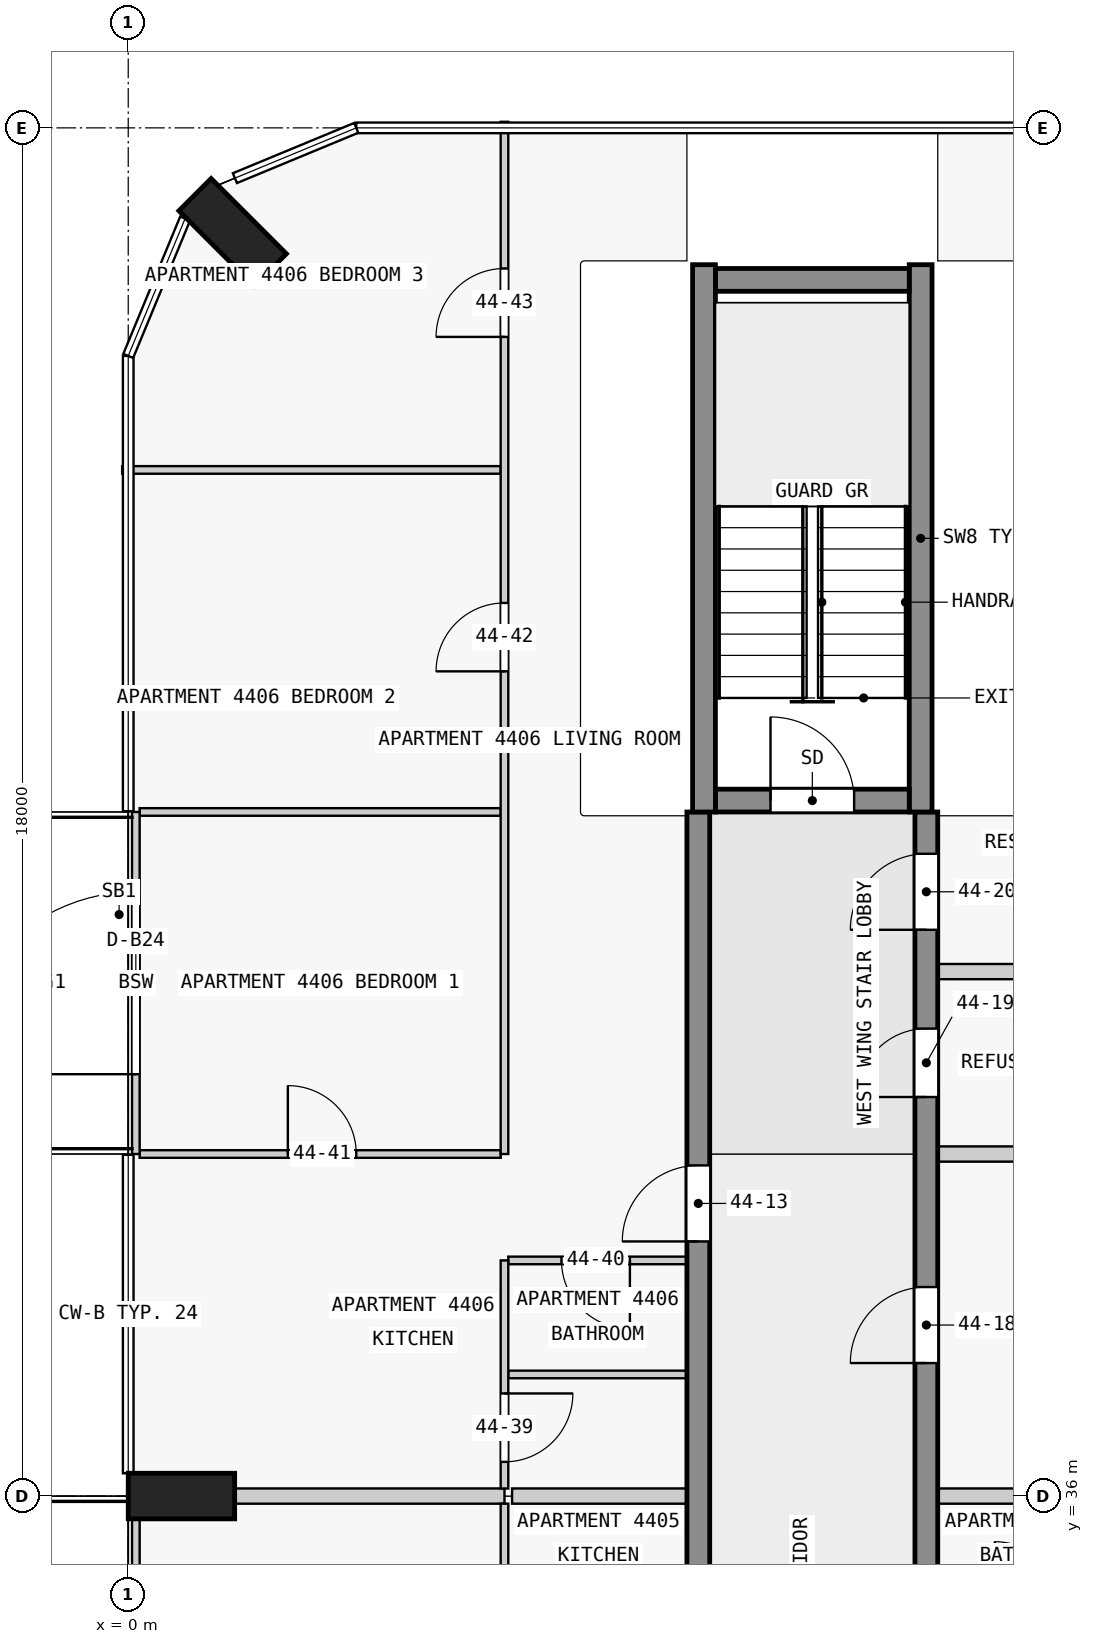
"""IFC4 building model, lengths in metres.
Left out: names, types, materials, properties, quantities, classifications, styles, units other than length and angle.
Written with IfcOpenShell. Run it as: python <this file> out.ifc"""

import sys

from ifc_helpers import new_model, si_unit, direction, frame, frame_2d, origin, origin_2d, place, context, subcontext, project, spatial, rectangle, extrude, element, fill, save


model = new_model("IFC4")
c1 = context("Model", 3, precision=1e-05, world=origin(), true_north=direction((0.0, 1.0)))
c2 = subcontext(c1, "Body", "Model", "MODEL_VIEW")
j1 = project(units=[si_unit("LENGTHUNIT", "METRE"), si_unit("PLANEANGLEUNIT", "RADIAN")], contexts=[c1])
p1 = place(None, origin())
s1 = spatial("IfcSite", under=j1, at=p1, CompositionType="ELEMENT")
p2 = place(p1, origin())
s2 = spatial("IfcBuilding", under=s1, at=p2, CompositionType="ELEMENT")
p3 = place(p2, frame((0.0, 0.0, 170.9)))
s3 = spatial("IfcBuildingStorey", under=s2, at=p3, CompositionType="ELEMENT", Elevation=170.9)
for number, where, z_axis, x_axis in (
    (1, (1.374, 52.626, 0.0), (0.0, 0.0, 1.0), (0.707, 0.707, 0.0)),
    (2, (0.7, 36.0, 0.0), (0.0, 0.0, 1.0), (0.0, 1.0, 0.0)),
):
    element("IfcColumn", number, at=place(p3, frame(where, z_axis=z_axis, x_axis=x_axis)), inside=s3, PredefinedType="COLUMN", context=c2, shape_type="SweptSolid", body=[
        extrude(rectangle(XDim=0.6, YDim=1.4, at=origin_2d()), origin(), (0.0, 0.0, 1.0), 3.5),
    ])
p4 = place(p3, frame((7.725, 45.15, 0.0), z_axis=(0.0, 0.0, 1.0), x_axis=(1.0, 0.0, 0.0)))
e3 = element("IfcWall", 3, at=p4, inside=s3, PredefinedType="SHEAR", context=c2, shape_type="SweptSolid", body=[
    extrude(rectangle(XDim=2.55, YDim=0.3, at=frame_2d((1.275, 0.0))), origin(), (0.0, 0.0, 1.0), 3.5),
])
p5 = place(p4, frame((0.725, 0.0, 0.0)))
e4 = element("IfcOpeningElement", 4, at=p5, cuts=e3, PredefinedType="OPENING", context=c2, shape_type="SweptSolid", body=[
    extrude(rectangle(XDim=1.1, YDim=2.1, at=frame_2d((0.55, 1.05))), frame((0.0, 0.16, 0.0), z_axis=(0.0, -1.0, 0.0), x_axis=(1.0, 0.0, 0.0)), (0.0, 0.0, 1.0), 0.32),
])
p6 = place(p3, frame((7.725, 52.0, 0.0), z_axis=(0.0, 0.0, 1.0), x_axis=(1.0, 0.0, 0.0)))
e5 = element("IfcWall", 5, at=p6, inside=s3, PredefinedType="SHEAR", context=c2, shape_type="SweptSolid", body=[
    extrude(rectangle(XDim=2.55, YDim=0.3, at=frame_2d((1.275, 0.0))), origin(), (0.0, 0.0, 1.0), 3.5),
])
for number, where, z_axis, x_axis in (
    (6, (7.575, 45.0, 0.0), (0.0, 0.0, 1.0), (0.0, 1.0, 0.0)),
    (7, (10.425, 45.0, 0.0), (0.0, 0.0, 1.0), (0.0, 1.0, 0.0)),
):
    element("IfcWall", number, at=place(p3, frame(where, z_axis=z_axis, x_axis=x_axis)), inside=s3, PredefinedType="SHEAR", context=c2, shape_type="SweptSolid", body=[
        extrude(rectangle(XDim=7.2, YDim=0.3, at=frame_2d((3.6, 0.0))), origin(), (0.0, 0.0, 1.0), 3.5),
    ])
p7 = place(p3, frame((7.5, 18.0, 0.0), z_axis=(0.0, 0.0, 1.0), x_axis=(0.0, 1.0, 0.0)))
e8 = element("IfcWall", 8, at=p7, inside=s3, PredefinedType="SHEAR", context=c2, shape_type="SweptSolid", body=[
    extrude(rectangle(XDim=27.0, YDim=0.3, at=frame_2d((13.5, 0.0))), origin(), (0.0, 0.0, 1.0), 3.25),
])
p8 = place(p7, frame((1.75, 0.0, 0.0)))
e9 = element("IfcOpeningElement", 9, at=p8, cuts=e8, PredefinedType="OPENING", context=c2, shape_type="SweptSolid", body=[
    extrude(rectangle(XDim=1.0, YDim=2.1, at=frame_2d((0.5, 1.05))), frame((0.0, 0.16, 0.0), z_axis=(0.0, -1.0, 0.0), x_axis=(1.0, 0.0, 0.0)), (0.0, 0.0, 1.0), 0.32),
])
p9 = place(p7, frame((5.85, 0.0, 0.0)))
e10 = element("IfcOpeningElement", 10, at=p9, cuts=e8, PredefinedType="OPENING", context=c2, shape_type="SweptSolid", body=[
    extrude(rectangle(XDim=1.8, YDim=2.1, at=frame_2d((0.9, 1.05))), frame((0.0, 0.16, 0.0), z_axis=(0.0, -1.0, 0.0), x_axis=(1.0, 0.0, 0.0)), (0.0, 0.0, 1.0), 0.32),
])
p10 = place(p7, frame((13.05, 0.0, 0.0)))
e11 = element("IfcOpeningElement", 11, at=p10, cuts=e8, PredefinedType="OPENING", context=c2, shape_type="SweptSolid", body=[
    extrude(rectangle(XDim=1.0, YDim=2.1, at=frame_2d((0.5, 1.05))), frame((0.0, 0.16, 0.0), z_axis=(0.0, -1.0, 0.0), x_axis=(1.0, 0.0, 0.0)), (0.0, 0.0, 1.0), 0.32),
])
p11 = place(p7, frame((21.35, 0.0, 0.0)))
e12 = element("IfcOpeningElement", 12, at=p11, cuts=e8, PredefinedType="OPENING", context=c2, shape_type="SweptSolid", body=[
    extrude(rectangle(XDim=1.0, YDim=2.1, at=frame_2d((0.5, 1.05))), frame((0.0, 0.16, 0.0), z_axis=(0.0, -1.0, 0.0), x_axis=(1.0, 0.0, 0.0)), (0.0, 0.0, 1.0), 0.32),
])
p12 = place(p3, frame((10.5, 18.0, 0.0), z_axis=(0.0, 0.0, 1.0), x_axis=(0.0, 1.0, 0.0)))
e13 = element("IfcWall", 13, at=p12, inside=s3, PredefinedType="SHEAR", context=c2, shape_type="SweptSolid", body=[
    extrude(rectangle(XDim=27.0, YDim=0.3, at=frame_2d((13.5, 0.0))), origin(), (0.0, 0.0, 1.0), 3.25),
])
p13 = place(p12, frame((1.75, 0.0, 0.0)))
e14 = element("IfcOpeningElement", 14, at=p13, cuts=e13, PredefinedType="OPENING", context=c2, shape_type="SweptSolid", body=[
    extrude(rectangle(XDim=1.0, YDim=2.1, at=frame_2d((0.5, 1.05))), frame((0.0, 0.16, 0.0), z_axis=(0.0, -1.0, 0.0), x_axis=(1.0, 0.0, 0.0)), (0.0, 0.0, 1.0), 0.32),
])
p14 = place(p12, frame((6.25, 0.0, 0.0)))
e15 = element("IfcOpeningElement", 15, at=p14, cuts=e13, PredefinedType="OPENING", context=c2, shape_type="SweptSolid", body=[
    extrude(rectangle(XDim=1.0, YDim=2.1, at=frame_2d((0.5, 1.05))), frame((0.0, 0.16, 0.0), z_axis=(0.0, -1.0, 0.0), x_axis=(1.0, 0.0, 0.0)), (0.0, 0.0, 1.0), 0.32),
])
p15 = place(p12, frame((10.75, 0.0, 0.0)))
e16 = element("IfcOpeningElement", 16, at=p15, cuts=e13, PredefinedType="OPENING", context=c2, shape_type="SweptSolid", body=[
    extrude(rectangle(XDim=1.0, YDim=2.1, at=frame_2d((0.5, 1.05))), frame((0.0, 0.16, 0.0), z_axis=(0.0, -1.0, 0.0), x_axis=(1.0, 0.0, 0.0)), (0.0, 0.0, 1.0), 0.32),
])
p16 = place(p12, frame((15.25, 0.0, 0.0)))
e17 = element("IfcOpeningElement", 17, at=p16, cuts=e13, PredefinedType="OPENING", context=c2, shape_type="SweptSolid", body=[
    extrude(rectangle(XDim=1.0, YDim=2.1, at=frame_2d((0.5, 1.05))), frame((0.0, 0.16, 0.0), z_axis=(0.0, -1.0, 0.0), x_axis=(1.0, 0.0, 0.0)), (0.0, 0.0, 1.0), 0.32),
])
p17 = place(p12, frame((19.75, 0.0, 0.0)))
e18 = element("IfcOpeningElement", 18, at=p17, cuts=e13, PredefinedType="OPENING", context=c2, shape_type="SweptSolid", body=[
    extrude(rectangle(XDim=1.0, YDim=2.1, at=frame_2d((0.5, 1.05))), frame((0.0, 0.16, 0.0), z_axis=(0.0, -1.0, 0.0), x_axis=(1.0, 0.0, 0.0)), (0.0, 0.0, 1.0), 0.32),
])
p18 = place(p12, frame((23.25, 0.0, 0.0)))
e19 = element("IfcOpeningElement", 19, at=p18, cuts=e13, PredefinedType="OPENING", context=c2, shape_type="SweptSolid", body=[
    extrude(rectangle(XDim=0.9, YDim=2.1, at=frame_2d((0.45, 1.05))), frame((0.0, 0.16, 0.0), z_axis=(0.0, -1.0, 0.0), x_axis=(1.0, 0.0, 0.0)), (0.0, 0.0, 1.0), 0.32),
])
p19 = place(p12, frame((25.45, 0.0, 0.0)))
e20 = element("IfcOpeningElement", 20, at=p19, cuts=e13, PredefinedType="OPENING", context=c2, shape_type="SweptSolid", body=[
    extrude(rectangle(XDim=1.0, YDim=2.1, at=frame_2d((0.5, 1.05))), frame((0.0, 0.16, 0.0), z_axis=(0.0, -1.0, 0.0), x_axis=(1.0, 0.0, 0.0)), (0.0, 0.0, 1.0), 0.32),
])
p20 = place(p3, frame((0.1, 31.5, 0.0), z_axis=(0.0, 0.0, 1.0), x_axis=(0.0, 1.0, 0.0)))
e21 = element("IfcWall", 21, at=p20, inside=s3, PredefinedType="STANDARD", context=c2, shape_type="SweptSolid", body=[
    extrude(rectangle(XDim=4.5, YDim=0.1, at=frame_2d((2.25, 0.0))), origin(), (0.0, 0.0, 1.0), 3.25),
])
p21 = place(p20, frame((1.05, 0.0, 0.0)))
e22 = element("IfcOpeningElement", 22, at=p21, cuts=e21, PredefinedType="OPENING", context=c2, shape_type="SweptSolid", body=[
    extrude(rectangle(XDim=2.4, YDim=2.4, at=frame_2d((1.2, 1.2))), frame((0.0, 0.06, 0.0), z_axis=(0.0, -1.0, 0.0), x_axis=(1.0, 0.0, 0.0)), (0.0, 0.0, 1.0), 0.12),
])
p22 = place(p3, frame((0.1, 40.5, 0.0), z_axis=(0.0, 0.0, 1.0), x_axis=(0.0, 1.0, 0.0)))
e23 = element("IfcWall", 23, at=p22, inside=s3, PredefinedType="STANDARD", context=c2, shape_type="SweptSolid", body=[
    extrude(rectangle(XDim=4.5, YDim=0.1, at=frame_2d((2.25, 0.0))), origin(), (0.0, 0.0, 1.0), 3.25),
])
p23 = place(p22, frame((1.05, 0.0, 0.0)))
e24 = element("IfcOpeningElement", 24, at=p23, cuts=e23, PredefinedType="OPENING", context=c2, shape_type="SweptSolid", body=[
    extrude(rectangle(XDim=2.4, YDim=2.4, at=frame_2d((1.2, 1.2))), frame((0.0, 0.06, 0.0), z_axis=(0.0, -1.0, 0.0), x_axis=(1.0, 0.0, 0.0)), (0.0, 0.0, 1.0), 0.12),
])
for number, where, z_axis, x_axis in (
    (25, (7.35, 36.0, 0.0), (0.0, 0.0, 1.0), (-1.0, 0.0, 0.0)),
    (26, (12.95, 36.0, 0.0), (0.0, 0.0, 1.0), (-1.0, 0.0, 0.0)),
):
    element("IfcWall", number, at=place(p3, frame(where, z_axis=z_axis, x_axis=x_axis)), inside=s3, PredefinedType="PARTITIONING", context=c2, shape_type="SweptSolid", body=[
        extrude(rectangle(XDim=2.3, YDim=0.2, at=frame_2d((1.15, 0.0))), origin(), (0.0, 0.0, 1.0), 3.25),
    ])
p24 = place(p3, frame((1.4, 36.0, 0.0), z_axis=(0.0, 0.0, 1.0), x_axis=(1.0, 0.0, 0.0)))
e27 = element("IfcWall", 27, at=p24, inside=s3, PredefinedType="PARTITIONING", context=c2, shape_type="SweptSolid", body=[
    extrude(rectangle(XDim=3.55, YDim=0.2, at=frame_2d((1.775, 0.0))), origin(), (0.0, 0.0, 1.0), 3.25),
])
p25 = place(p3, frame((7.35, 37.6, 0.0), z_axis=(0.0, 0.0, 1.0), x_axis=(-1.0, 0.0, 0.0)))
e28 = element("IfcWall", 28, at=p25, inside=s3, PredefinedType="PARTITIONING", context=c2, shape_type="SweptSolid", body=[
    extrude(rectangle(XDim=2.35, YDim=0.1, at=frame_2d((1.175, 0.0))), origin(), (0.0, 0.0, 1.0), 3.25),
])
p26 = place(p3, frame((7.35, 39.1, 0.0), z_axis=(0.0, 0.0, 1.0), x_axis=(-1.0, 0.0, 0.0)))
e29 = element("IfcWall", 29, at=p26, inside=s3, PredefinedType="PARTITIONING", context=c2, shape_type="SweptSolid", body=[
    extrude(rectangle(XDim=2.35, YDim=0.1, at=frame_2d((1.175, 0.0))), origin(), (0.0, 0.0, 1.0), 3.25),
])
p27 = place(p26, frame((0.75, 0.0, 0.0)))
e30 = element("IfcOpeningElement", 30, at=p27, cuts=e29, PredefinedType="OPENING", context=c2, shape_type="SweptSolid", body=[
    extrude(rectangle(XDim=0.9, YDim=2.1, at=frame_2d((0.45, 1.05))), frame((0.0, 0.06, 0.0), z_axis=(0.0, -1.0, 0.0), x_axis=(1.0, 0.0, 0.0)), (0.0, 0.0, 1.0), 0.12),
])
p28 = place(p3, frame((0.15, 40.5, 0.0), z_axis=(0.0, 0.0, 1.0), x_axis=(1.0, 0.0, 0.0)))
e31 = element("IfcWall", 31, at=p28, inside=s3, PredefinedType="PARTITIONING", context=c2, shape_type="SweptSolid", body=[
    extrude(rectangle(XDim=4.75, YDim=0.1, at=frame_2d((2.375, 0.0))), origin(), (0.0, 0.0, 1.0), 3.25),
])
p29 = place(p28, frame((1.95, 0.0, 0.0)))
e32 = element("IfcOpeningElement", 32, at=p29, cuts=e31, PredefinedType="OPENING", context=c2, shape_type="SweptSolid", body=[
    extrude(rectangle(XDim=0.9, YDim=2.1, at=frame_2d((0.45, 1.05))), frame((0.0, 0.06, 0.0), z_axis=(0.0, -1.0, 0.0), x_axis=(1.0, 0.0, 0.0)), (0.0, 0.0, 1.0), 0.12),
])
p30 = place(p3, frame((18.08, 40.5, 0.0), z_axis=(0.0, 0.0, 1.0), x_axis=(-1.0, 0.0, 0.0)))
e33 = element("IfcWall", 33, at=p30, inside=s3, PredefinedType="PARTITIONING", context=c2, shape_type="SweptSolid", body=[
    extrude(rectangle(XDim=7.43, YDim=0.2, at=frame_2d((3.715, 0.0))), origin(), (0.0, 0.0, 1.0), 3.25),
])
p31 = place(p3, frame((13.05, 42.9, 0.0), z_axis=(0.0, 0.0, 1.0), x_axis=(-1.0, 0.0, 0.0)))
e34 = element("IfcWall", 34, at=p31, inside=s3, PredefinedType="PARTITIONING", context=c2, shape_type="SweptSolid", body=[
    extrude(rectangle(XDim=2.4, YDim=0.2, at=frame_2d((1.2, 0.0))), origin(), (0.0, 0.0, 1.0), 3.25),
])
p32 = place(p3, frame((4.9, 45.0, 0.0), z_axis=(0.0, 0.0, 1.0), x_axis=(-1.0, 0.0, 0.0)))
e35 = element("IfcWall", 35, at=p32, inside=s3, PredefinedType="PARTITIONING", context=c2, shape_type="SweptSolid", body=[
    extrude(rectangle(XDim=4.75, YDim=0.1, at=frame_2d((2.375, 0.0))), origin(), (0.0, 0.0, 1.0), 3.25),
])
p33 = place(p3, frame((4.9, 49.5, 0.0), z_axis=(0.0, 0.0, 1.0), x_axis=(-1.0, 0.0, 0.0)))
e36 = element("IfcWall", 36, at=p33, inside=s3, PredefinedType="PARTITIONING", context=c2, shape_type="SweptSolid", body=[
    extrude(rectangle(XDim=4.98, YDim=0.1, at=frame_2d((2.49, 0.0))), origin(), (0.0, 0.0, 1.0), 3.25),
])
p34 = place(p3, frame((4.95, 35.9, 0.0), z_axis=(0.0, 0.0, 1.0), x_axis=(0.0, -1.0, 0.0)))
e37 = element("IfcWall", 37, at=p34, inside=s3, PredefinedType="PARTITIONING", context=c2, shape_type="SweptSolid", body=[
    extrude(rectangle(XDim=1.7, YDim=0.1, at=frame_2d((0.85, 0.0))), origin(), (0.0, 0.0, 1.0), 3.25),
])
p35 = place(p3, frame((4.95, 39.1, 0.0), z_axis=(0.0, 0.0, 1.0), x_axis=(0.0, -1.0, 0.0)))
e38 = element("IfcWall", 38, at=p35, inside=s3, PredefinedType="PARTITIONING", context=c2, shape_type="SweptSolid", body=[
    extrude(rectangle(XDim=3.0, YDim=0.1, at=frame_2d((1.5, 0.0))), origin(), (0.0, 0.0, 1.0), 3.25),
])
p36 = place(p35, frame((1.75, 0.0, 0.0)))
e39 = element("IfcOpeningElement", 39, at=p36, cuts=e38, PredefinedType="OPENING", context=c2, shape_type="SweptSolid", body=[
    extrude(rectangle(XDim=0.9, YDim=2.1, at=frame_2d((0.45, 1.05))), frame((0.0, 0.06, 0.0), z_axis=(0.0, -1.0, 0.0), x_axis=(1.0, 0.0, 0.0)), (0.0, 0.0, 1.0), 0.12),
])
p37 = place(p3, frame((4.95, 40.5, 0.0), z_axis=(0.0, 0.0, 1.0), x_axis=(0.0, 1.0, 0.0)))
e40 = element("IfcWall", 40, at=p37, inside=s3, PredefinedType="PARTITIONING", context=c2, shape_type="SweptSolid", body=[
    extrude(rectangle(XDim=13.58, YDim=0.1, at=frame_2d((6.79, 0.0))), origin(), (0.0, 0.0, 1.0), 3.25),
])
p38 = place(p37, frame((6.35, 0.0, 0.0)))
e41 = element("IfcOpeningElement", 41, at=p38, cuts=e40, PredefinedType="OPENING", context=c2, shape_type="SweptSolid", body=[
    extrude(rectangle(XDim=0.9, YDim=2.1, at=frame_2d((0.45, 1.05))), frame((0.0, 0.06, 0.0), z_axis=(0.0, -1.0, 0.0), x_axis=(1.0, 0.0, 0.0)), (0.0, 0.0, 1.0), 0.12),
])
p39 = place(p37, frame((10.75, 0.0, 0.0)))
e42 = element("IfcOpeningElement", 42, at=p39, cuts=e40, PredefinedType="OPENING", context=c2, shape_type="SweptSolid", body=[
    extrude(rectangle(XDim=0.9, YDim=2.1, at=frame_2d((0.45, 1.05))), frame((0.0, 0.06, 0.0), z_axis=(0.0, -1.0, 0.0), x_axis=(1.0, 0.0, 0.0)), (0.0, 0.0, 1.0), 0.12),
])
p40 = place(p23, origin())
e43 = element("IfcDoor", 43, at=p40, inside=s3, OperationType="SINGLE_SWING_LEFT", PredefinedType="DOOR", context=c2, shape_type="SweptSolid", body=[
    extrude(rectangle(XDim=2.4, YDim=2.4, at=frame_2d((1.2, 1.2))), frame((0.0, 0.025, 0.0), z_axis=(0.0, -1.0, 0.0), x_axis=(1.0, 0.0, 0.0)), (0.0, 0.0, 1.0), 0.05),
])
fill(e24, e43)
p41 = place(p5, origin())
e44 = element("IfcDoor", 44, at=p41, inside=s3, OperationType="SINGLE_SWING_LEFT", PredefinedType="DOOR", context=c2, shape_type="SweptSolid", body=[
    extrude(rectangle(XDim=1.1, YDim=2.1, at=frame_2d((0.55, 1.05))), frame((0.0, 0.025, 0.0), z_axis=(0.0, -1.0, 0.0), x_axis=(1.0, 0.0, 0.0)), (0.0, 0.0, 1.0), 0.05),
])
fill(e4, e44)
p42 = place(p11, origin())
e45 = element("IfcDoor", 45, at=p42, inside=s3, OperationType="SINGLE_SWING_RIGHT", PredefinedType="DOOR", context=c2, shape_type="SweptSolid", body=[
    extrude(rectangle(XDim=1.0, YDim=2.1, at=frame_2d((0.5, 1.05))), frame((0.0, 0.025, 0.0), z_axis=(0.0, -1.0, 0.0), x_axis=(1.0, 0.0, 0.0)), (0.0, 0.0, 1.0), 0.05),
])
fill(e12, e45)
p43 = place(p17, origin())
e46 = element("IfcDoor", 46, at=p43, inside=s3, OperationType="SINGLE_SWING_RIGHT", PredefinedType="DOOR", context=c2, shape_type="SweptSolid", body=[
    extrude(rectangle(XDim=1.0, YDim=2.1, at=frame_2d((0.5, 1.05))), frame((0.0, 0.025, 0.0), z_axis=(0.0, -1.0, 0.0), x_axis=(1.0, 0.0, 0.0)), (0.0, 0.0, 1.0), 0.05),
])
fill(e18, e46)
p44 = place(p18, origin())
e47 = element("IfcDoor", 47, at=p44, inside=s3, OperationType="SINGLE_SWING_RIGHT", PredefinedType="DOOR", context=c2, shape_type="SweptSolid", body=[
    extrude(rectangle(XDim=0.9, YDim=2.1, at=frame_2d((0.45, 1.05))), frame((0.0, 0.025, 0.0), z_axis=(0.0, -1.0, 0.0), x_axis=(1.0, 0.0, 0.0)), (0.0, 0.0, 1.0), 0.05),
])
fill(e19, e47)
p45 = place(p19, origin())
e48 = element("IfcDoor", 48, at=p45, inside=s3, OperationType="SINGLE_SWING_RIGHT", PredefinedType="DOOR", context=c2, shape_type="SweptSolid", body=[
    extrude(rectangle(XDim=1.0, YDim=2.1, at=frame_2d((0.5, 1.05))), frame((0.0, 0.025, 0.0), z_axis=(0.0, -1.0, 0.0), x_axis=(1.0, 0.0, 0.0)), (0.0, 0.0, 1.0), 0.05),
])
fill(e20, e48)
p46 = place(p36, origin())
e49 = element("IfcDoor", 49, at=p46, inside=s3, OperationType="SINGLE_SWING_RIGHT", PredefinedType="DOOR", context=c2, shape_type="SweptSolid", body=[
    extrude(rectangle(XDim=0.9, YDim=2.1, at=frame_2d((0.45, 1.05))), frame((0.0, 0.025, 0.0), z_axis=(0.0, -1.0, 0.0), x_axis=(1.0, 0.0, 0.0)), (0.0, 0.0, 1.0), 0.05),
])
fill(e39, e49)
p47 = place(p27, origin())
e50 = element("IfcDoor", 50, at=p47, inside=s3, OperationType="SINGLE_SWING_RIGHT", PredefinedType="DOOR", context=c2, shape_type="SweptSolid", body=[
    extrude(rectangle(XDim=0.9, YDim=2.1, at=frame_2d((0.45, 1.05))), frame((0.0, 0.025, 0.0), z_axis=(0.0, -1.0, 0.0), x_axis=(1.0, 0.0, 0.0)), (0.0, 0.0, 1.0), 0.05),
])
fill(e30, e50)
p48 = place(p29, origin())
e51 = element("IfcDoor", 51, at=p48, inside=s3, OperationType="SINGLE_SWING_RIGHT", PredefinedType="DOOR", context=c2, shape_type="SweptSolid", body=[
    extrude(rectangle(XDim=0.9, YDim=2.1, at=frame_2d((0.45, 1.05))), frame((0.0, 0.025, 0.0), z_axis=(0.0, -1.0, 0.0), x_axis=(1.0, 0.0, 0.0)), (0.0, 0.0, 1.0), 0.05),
])
fill(e32, e51)
p49 = place(p38, origin())
e52 = element("IfcDoor", 52, at=p49, inside=s3, OperationType="SINGLE_SWING_RIGHT", PredefinedType="DOOR", context=c2, shape_type="SweptSolid", body=[
    extrude(rectangle(XDim=0.9, YDim=2.1, at=frame_2d((0.45, 1.05))), frame((0.0, 0.025, 0.0), z_axis=(0.0, -1.0, 0.0), x_axis=(1.0, 0.0, 0.0)), (0.0, 0.0, 1.0), 0.05),
])
fill(e41, e52)
p50 = place(p39, origin())
e53 = element("IfcDoor", 53, at=p50, inside=s3, OperationType="SINGLE_SWING_RIGHT", PredefinedType="DOOR", context=c2, shape_type="SweptSolid", body=[
    extrude(rectangle(XDim=0.9, YDim=2.1, at=frame_2d((0.45, 1.05))), frame((0.0, 0.025, 0.0), z_axis=(0.0, -1.0, 0.0), x_axis=(1.0, 0.0, 0.0)), (0.0, 0.0, 1.0), 0.05),
])
fill(e42, e53)
save(model, sys.argv[1])
